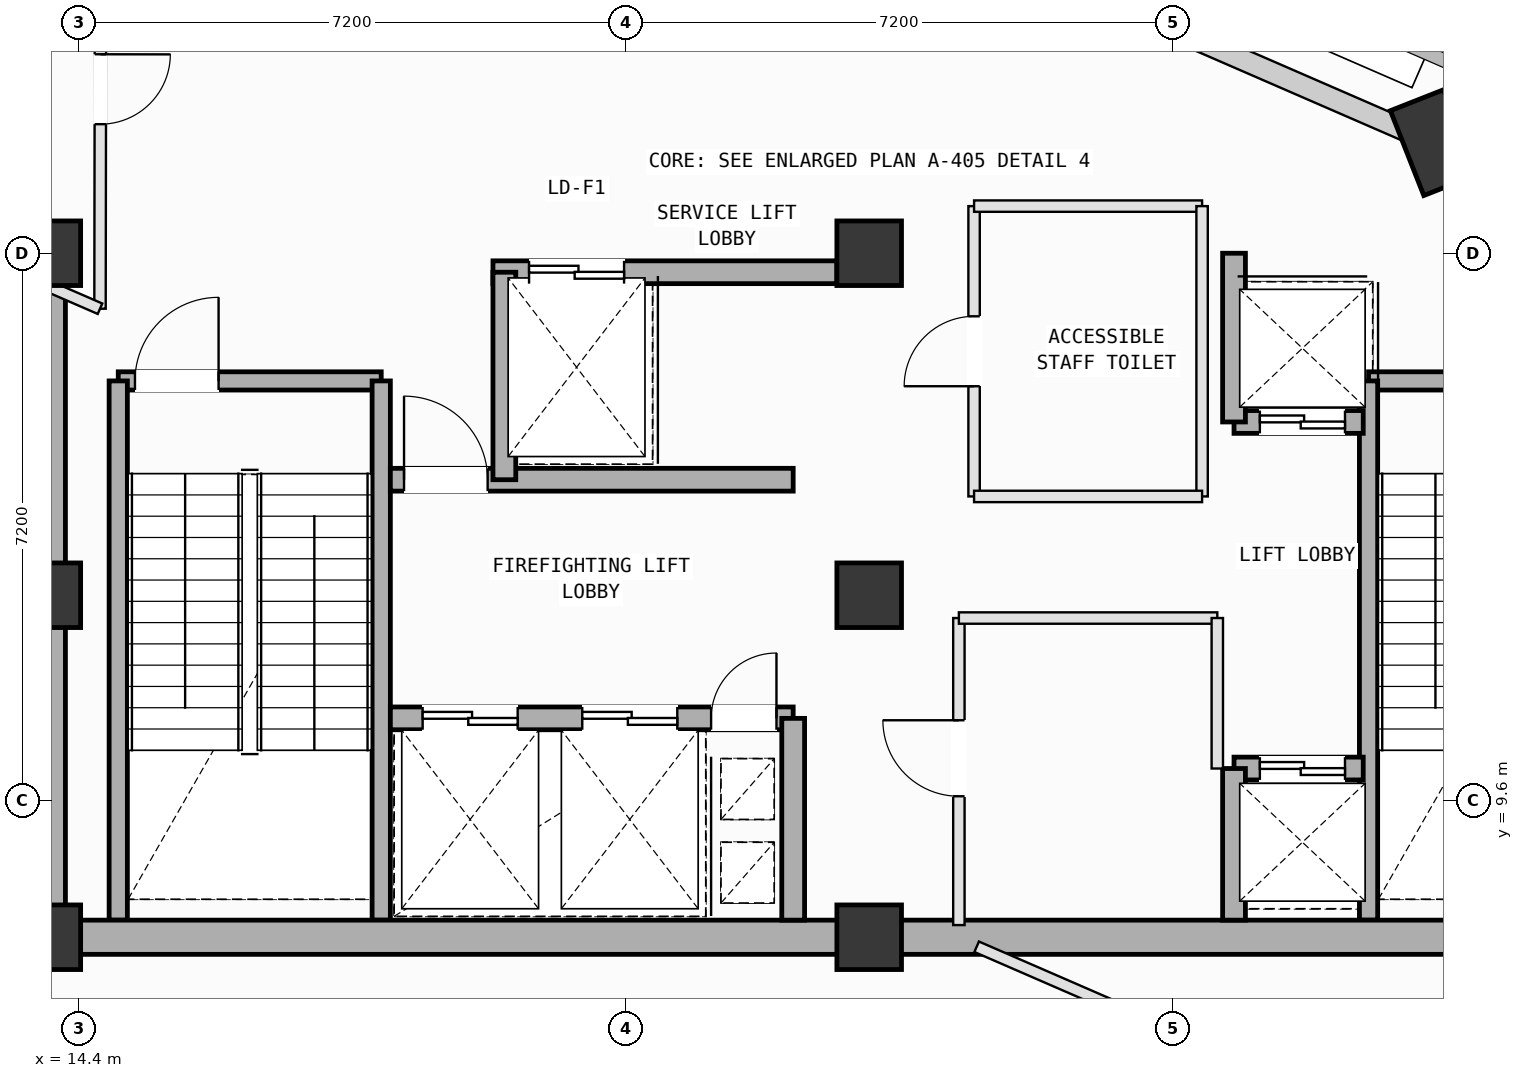
"""IFC4 building model, lengths in metres.
Left out: names, types, materials, properties, quantities, classifications, styles, units other than length and angle.
Written with IfcOpenShell. Run it as: python <this file> out.ifc"""

import sys

from ifc_helpers import new_model, si_unit, direction, frame, frame_2d, origin, origin_2d, place, context, subcontext, project, spatial, rectangle, extrude, element, fill, save


model = new_model("IFC4")
c1 = context("Model", 3, precision=1e-05, world=origin(), true_north=direction((0.0, 1.0)))
c2 = subcontext(c1, "Body", "Model", "MODEL_VIEW")
j1 = project(units=[si_unit("LENGTHUNIT", "METRE"), si_unit("PLANEANGLEUNIT", "RADIAN")], contexts=[c1])
p1 = place(None, origin())
s1 = spatial("IfcSite", under=j1, at=p1, CompositionType="ELEMENT")
p2 = place(p1, origin())
s2 = spatial("IfcBuilding", under=s1, at=p2, CompositionType="ELEMENT")
p3 = place(p2, frame((0.0, 0.0, 328.6)))
s3 = spatial("IfcBuildingStorey", under=s2, at=p3, CompositionType="ELEMENT", Elevation=328.6)
for number, where, z_axis, x_axis in (
    (1, (14.0, 7.8, 0.0), (0.0, 0.0, 1.0), (1.0, 0.0, 0.0)),
    (2, (14.0, 12.3, 0.0), (0.0, 0.0, 1.0), (1.0, 0.0, 0.0)),
    (3, (14.0, 16.8, 0.0), (0.0, 0.0, 1.0), (1.0, 0.0, 0.0)),
    (4, (24.8, 7.8, 0.0), (0.0, 0.0, 1.0), (1.0, 0.0, 0.0)),
    (5, (24.8, 12.3, 0.0), (0.0, 0.0, 1.0), (1.0, 0.0, 0.0)),
    (6, (24.8, 16.8, 0.0), (0.0, 0.0, 1.0), (1.0, 0.0, 0.0)),
):
    element("IfcColumn", number, at=place(p3, frame(where, z_axis=z_axis, x_axis=x_axis)), inside=s3, PredefinedType="COLUMN", context=c2, shape_type="SweptSolid", body=[
        extrude(rectangle(XDim=0.85, YDim=0.85, at=origin_2d()), origin(), (0.0, 0.0, 1.0), 4.8),
    ])
p4 = place(p3, frame((32.226, 18.255, 0.002), z_axis=(0.0, 0.0, 1.0), x_axis=(-0.366501226724, 0.930417567982, 0.0)))
e7 = element("IfcColumn", 7, at=p4, inside=s3, PredefinedType="COLUMN", context=c2, shape_type="SweptSolid", body=[
    extrude(rectangle(XDim=1.2, YDim=0.75, at=origin_2d()), origin(), (0.0, 0.0, 1.0), 4.796),
])
p5 = place(p3, frame((32.385, 18.619, 0.0), z_axis=(0.0, 0.0, 1.0), x_axis=(0.398753668733, 0.917058074318, 0.0)))
e8 = element("IfcWall", 8, at=p5, inside=s3, PredefinedType="SOLIDWALL", context=c2, shape_type="SweptSolid", body=[
    extrude(rectangle(XDim=6.155, YDim=0.28, at=frame_2d((3.078, 0.0))), origin(), (0.0, 0.0, 1.0), 4.065),
])
p6 = place(p5, frame((0.875, 0.0, 0.75)))
e9 = element("IfcOpeningElement", 9, at=p6, cuts=e8, PredefinedType="OPENING", context=c2, shape_type="SweptSolid", body=[
    extrude(rectangle(XDim=1.4, YDim=1.85, at=frame_2d((0.7, 0.925))), frame((0.0, 0.15, 0.0), z_axis=(0.0, -1.0, 0.0), x_axis=(1.0, 0.0, 0.0)), (0.0, 0.0, 1.0), 0.3),
])
p7 = place(p3, frame((25.484, 21.187, 0.0), z_axis=(0.0, 0.0, 1.0), x_axis=(0.917060568388, -0.398747932794, 0.0)))
e10 = element("IfcWall", 10, at=p7, inside=s3, PredefinedType="SOLIDWALL", context=c2, shape_type="SweptSolid", body=[
    extrude(rectangle(XDim=6.955, YDim=0.28, at=frame_2d((3.478, 0.0))), origin(), (0.0, 0.0, 1.0), 3.565),
])
p8 = place(p3, frame((14.92, 15.12, 0.0), z_axis=(0.0, 0.0, 1.0), x_axis=(1.0, 0.0, 0.0)))
e11 = element("IfcWall", 11, at=p8, inside=s3, PredefinedType="SOLIDWALL", context=c2, shape_type="SweptSolid", body=[
    extrude(rectangle(XDim=3.46, YDim=0.24, at=frame_2d((1.73, 0.0))), origin(), (0.0, 0.0, 1.0), 4.58),
])
p9 = place(p8, frame((0.22, 0.0, 0.0)))
e12 = element("IfcOpeningElement", 12, at=p9, cuts=e11, PredefinedType="OPENING", context=c2, shape_type="SweptSolid", body=[
    extrude(rectangle(XDim=1.1, YDim=2.15, at=frame_2d((0.55, 1.075))), frame((0.0, 0.13, 0.0), z_axis=(0.0, -1.0, 0.0), x_axis=(1.0, 0.0, 0.0)), (0.0, 0.0, 1.0), 0.26),
])
for number, where, z_axis, x_axis in (
    (13, (18.38, 15.12, 0.0), (0.0, 0.0, 1.0), (0.0, -1.0, 0.0)),
    (14, (14.92, 8.025, 0.0), (0.0, 0.0, 1.0), (0.0, 1.0, 0.0)),
):
    element("IfcWall", number, at=place(p3, frame(where, z_axis=z_axis, x_axis=x_axis)), inside=s3, PredefinedType="SOLIDWALL", context=c2, shape_type="SweptSolid", body=[
        extrude(rectangle(XDim=7.095, YDim=0.24, at=frame_2d((3.548, 0.0))), origin(), (0.0, 0.0, 1.0), 4.58),
    ])
p10 = place(p3, frame((31.37, 15.12, 0.0), z_axis=(0.0, 0.0, 1.0), x_axis=(1.0, 0.0, 0.0)))
e15 = element("IfcWall", 15, at=p10, inside=s3, PredefinedType="SOLIDWALL", context=c2, shape_type="SweptSolid", body=[
    extrude(rectangle(XDim=3.46, YDim=0.24, at=frame_2d((1.73, 0.0))), origin(), (0.0, 0.0, 1.0), 4.58),
])
p11 = place(p10, frame((2.14, 0.0, 0.0)))
e16 = element("IfcOpeningElement", 16, at=p11, cuts=e15, PredefinedType="OPENING", context=c2, shape_type="SweptSolid", body=[
    extrude(rectangle(XDim=1.1, YDim=2.15, at=frame_2d((0.55, 1.075))), frame((0.0, 0.13, 0.0), z_axis=(0.0, -1.0, 0.0), x_axis=(1.0, 0.0, 0.0)), (0.0, 0.0, 1.0), 0.26),
])
p12 = place(p3, frame((31.37, 8.025, 0.0), z_axis=(0.0, 0.0, 1.0), x_axis=(0.0, 1.0, 0.0)))
e17 = element("IfcWall", 17, at=p12, inside=s3, PredefinedType="SOLIDWALL", context=c2, shape_type="SweptSolid", body=[
    extrude(rectangle(XDim=7.095, YDim=0.24, at=frame_2d((3.548, 0.0))), origin(), (0.0, 0.0, 1.0), 4.58),
])
for number, where, z_axis, x_axis in (
    (18, (14.0, 7.8, 0.0), (0.0, 0.0, 1.0), (1.0, 0.0, 0.0)),
    (19, (24.8, 7.8, 0.0), (0.0, 0.0, 1.0), (1.0, 0.0, 0.0)),
):
    element("IfcWall", number, at=place(p3, frame(where, z_axis=z_axis, x_axis=x_axis)), inside=s3, PredefinedType="SHEAR", context=c2, shape_type="SweptSolid", body=[
        extrude(rectangle(XDim=10.8, YDim=0.45, at=frame_2d((5.4, 0.0))), origin(), (0.0, 0.0, 1.0), 4.58),
    ])
p13 = place(p3, frame((14.0, 16.8, 0.0), z_axis=(0.0, 0.0, 1.0), x_axis=(0.0, -1.0, 0.0)))
e20 = element("IfcWall", 20, at=p13, inside=s3, PredefinedType="SHEAR", context=c2, shape_type="SweptSolid", body=[
    extrude(rectangle(XDim=9.0, YDim=0.45, at=frame_2d((4.5, 0.0))), origin(), (0.0, 0.0, 1.0), 4.58),
])
p14 = place(p3, frame((19.85, 16.55, 0.0), z_axis=(0.0, 0.0, 1.0), x_axis=(1.0, 0.0, 0.0)))
e21 = element("IfcWall", 21, at=p14, inside=s3, PredefinedType="SOLIDWALL", context=c2, shape_type="SweptSolid", body=[
    extrude(rectangle(XDim=4.525, YDim=0.3, at=frame_2d((2.262, 0.0))), origin(), (0.0, 0.0, 1.0), 4.58),
])
p15 = place(p14, frame((0.475, 0.0, 0.0)))
e22 = element("IfcOpeningElement", 22, at=p15, cuts=e21, PredefinedType="OPENING", context=c2, shape_type="SweptSolid", body=[
    extrude(rectangle(XDim=1.25, YDim=2.18, at=frame_2d((0.625, 1.09))), frame((0.0, 0.16, 0.0), z_axis=(0.0, -1.0, 0.0), x_axis=(1.0, 0.0, 0.0)), (0.0, 0.0, 1.0), 0.32),
])
p16 = place(p3, frame((18.5, 10.68, 0.0), z_axis=(0.0, 0.0, 1.0), x_axis=(1.0, 0.0, 0.0)))
e23 = element("IfcWall", 23, at=p16, inside=s3, PredefinedType="SOLIDWALL", context=c2, shape_type="SweptSolid", body=[
    extrude(rectangle(XDim=5.3, YDim=0.3, at=frame_2d((2.65, 0.0))), origin(), (0.0, 0.0, 1.0), 4.58),
])
p17 = place(p16, frame((4.22, 0.0, 0.0)))
e24 = element("IfcOpeningElement", 24, at=p17, cuts=e23, PredefinedType="OPENING", context=c2, shape_type="SweptSolid", body=[
    extrude(rectangle(XDim=0.86, YDim=2.06, at=frame_2d((0.43, 1.03))), frame((0.0, 0.16, 0.0), z_axis=(0.0, -1.0, 0.0), x_axis=(1.0, 0.0, 0.0)), (0.0, 0.0, 1.0), 0.32),
])
p18 = place(p16, frame((0.425, 0.0, 0.0)))
e25 = element("IfcOpeningElement", 25, at=p18, cuts=e23, PredefinedType="OPENING", context=c2, shape_type="SweptSolid", body=[
    extrude(rectangle(XDim=1.25, YDim=2.18, at=frame_2d((0.625, 1.09))), frame((0.0, 0.16, 0.0), z_axis=(0.0, -1.0, 0.0), x_axis=(1.0, 0.0, 0.0)), (0.0, 0.0, 1.0), 0.32),
])
p19 = place(p16, frame((2.525, 0.0, 0.0)))
e26 = element("IfcOpeningElement", 26, at=p19, cuts=e23, PredefinedType="OPENING", context=c2, shape_type="SweptSolid", body=[
    extrude(rectangle(XDim=1.25, YDim=2.18, at=frame_2d((0.625, 1.09))), frame((0.0, 0.16, 0.0), z_axis=(0.0, -1.0, 0.0), x_axis=(1.0, 0.0, 0.0)), (0.0, 0.0, 1.0), 0.32),
])
p20 = place(p3, frame((18.5, 13.82, 0.0), z_axis=(0.0, 0.0, 1.0), x_axis=(1.0, 0.0, 0.0)))
e27 = element("IfcWall", 27, at=p20, inside=s3, PredefinedType="SOLIDWALL", context=c2, shape_type="SweptSolid", body=[
    extrude(rectangle(XDim=5.3, YDim=0.3, at=frame_2d((2.65, 0.0))), origin(), (0.0, 0.0, 1.0), 4.58),
])
p21 = place(p20, frame((0.18, 0.0, 0.0)))
e28 = element("IfcOpeningElement", 28, at=p21, cuts=e27, PredefinedType="OPENING", context=c2, shape_type="SweptSolid", body=[
    extrude(rectangle(XDim=1.1, YDim=2.15, at=frame_2d((0.55, 1.075))), frame((0.0, 0.16, 0.0), z_axis=(0.0, -1.0, 0.0), x_axis=(1.0, 0.0, 0.0)), (0.0, 0.0, 1.0), 0.32),
])
p22 = place(p3, frame((23.8, 8.025, 0.0), z_axis=(0.0, 0.0, 1.0), x_axis=(0.0, 1.0, 0.0)))
e29 = element("IfcWall", 29, at=p22, inside=s3, PredefinedType="SOLIDWALL", context=c2, shape_type="SweptSolid", body=[
    extrude(rectangle(XDim=2.655, YDim=0.3, at=frame_2d((1.328, 0.0))), origin(), (0.0, 0.0, 1.0), 4.58),
])
p23 = place(p3, frame((20.0, 13.82, 0.0), z_axis=(0.0, 0.0, 1.0), x_axis=(0.0, 1.0, 0.0)))
e30 = element("IfcWall", 30, at=p23, inside=s3, PredefinedType="SOLIDWALL", context=c2, shape_type="SweptSolid", body=[
    extrude(rectangle(XDim=2.73, YDim=0.3, at=frame_2d((1.365, 0.0))), origin(), (0.0, 0.0, 1.0), 4.58),
])
p24 = place(p3, frame((29.6, 10.02, 0.0), z_axis=(0.0, 0.0, 1.0), x_axis=(1.0, 0.0, 0.0)))
e31 = element("IfcWall", 31, at=p24, inside=s3, PredefinedType="SOLIDWALL", context=c2, shape_type="SweptSolid", body=[
    extrude(rectangle(XDim=1.7, YDim=0.3, at=frame_2d((0.85, 0.0))), origin(), (0.0, 0.0, 1.0), 4.58),
])
p25 = place(p24, frame((0.34, 0.0, 0.0)))
e32 = element("IfcOpeningElement", 32, at=p25, cuts=e31, PredefinedType="OPENING", context=c2, shape_type="SweptSolid", body=[
    extrude(rectangle(XDim=1.12, YDim=2.15, at=frame_2d((0.56, 1.075))), frame((0.0, 0.16, 0.0), z_axis=(0.0, -1.0, 0.0), x_axis=(1.0, 0.0, 0.0)), (0.0, 0.0, 1.0), 0.32),
])
p26 = place(p3, frame((29.6, 8.025, 0.0), z_axis=(0.0, 0.0, 1.0), x_axis=(0.0, 1.0, 0.0)))
e33 = element("IfcWall", 33, at=p26, inside=s3, PredefinedType="SOLIDWALL", context=c2, shape_type="SweptSolid", body=[
    extrude(rectangle(XDim=1.995, YDim=0.3, at=frame_2d((0.998, 0.0))), origin(), (0.0, 0.0, 1.0), 4.58),
])
p27 = place(p3, frame((29.6, 14.58, 0.0), z_axis=(0.0, 0.0, 1.0), x_axis=(1.0, 0.0, 0.0)))
e34 = element("IfcWall", 34, at=p27, inside=s3, PredefinedType="SOLIDWALL", context=c2, shape_type="SweptSolid", body=[
    extrude(rectangle(XDim=1.7, YDim=0.3, at=frame_2d((0.85, 0.0))), origin(), (0.0, 0.0, 1.0), 4.58),
])
p28 = place(p27, frame((0.34, 0.0, 0.0)))
e35 = element("IfcOpeningElement", 35, at=p28, cuts=e34, PredefinedType="OPENING", context=c2, shape_type="SweptSolid", body=[
    extrude(rectangle(XDim=1.12, YDim=2.15, at=frame_2d((0.56, 1.075))), frame((0.0, 0.16, 0.0), z_axis=(0.0, -1.0, 0.0), x_axis=(1.0, 0.0, 0.0)), (0.0, 0.0, 1.0), 0.32),
])
p29 = place(p3, frame((29.6, 14.58, 0.0), z_axis=(0.0, 0.0, 1.0), x_axis=(0.0, 1.0, 0.0)))
e36 = element("IfcWall", 36, at=p29, inside=s3, PredefinedType="SOLIDWALL", context=c2, shape_type="SweptSolid", body=[
    extrude(rectangle(XDim=2.22, YDim=0.3, at=frame_2d((1.11, 0.0))), origin(), (0.0, 0.0, 1.0), 4.58),
])
p30 = place(p3, frame((25.98, 7.96, 0.0), z_axis=(0.0, 0.0, 1.0), x_axis=(0.0, 1.0, 0.0)))
e37 = element("IfcWall", 37, at=p30, inside=s3, PredefinedType="PARTITIONING", context=c2, shape_type="SweptSolid", body=[
    extrude(rectangle(XDim=4.04, YDim=0.15, at=frame_2d((2.02, 0.0))), origin(), (0.0, 0.0, 1.0), 4.58),
])
p31 = place(p30, frame((1.695, 0.0, 0.0)))
e38 = element("IfcOpeningElement", 38, at=p31, cuts=e37, PredefinedType="OPENING", context=c2, shape_type="SweptSolid", body=[
    extrude(rectangle(XDim=1.0, YDim=2.12, at=frame_2d((0.5, 1.06))), frame((0.0, 0.085, 0.0), z_axis=(0.0, -1.0, 0.0), x_axis=(1.0, 0.0, 0.0)), (0.0, 0.0, 1.0), 0.17),
])
p32 = place(p3, frame((25.98, 12.0, 0.0), z_axis=(0.0, 0.0, 1.0), x_axis=(1.0, 0.0, 0.0)))
e39 = element("IfcWall", 39, at=p32, inside=s3, PredefinedType="PARTITIONING", context=c2, shape_type="SweptSolid", body=[
    extrude(rectangle(XDim=3.4, YDim=0.15, at=frame_2d((1.7, 0.0))), origin(), (0.0, 0.0, 1.0), 4.58),
])
p33 = place(p3, frame((29.38, 12.0, 0.0), z_axis=(0.0, 0.0, 1.0), x_axis=(0.0, -1.0, 0.0)))
e40 = element("IfcWall", 40, at=p33, inside=s3, PredefinedType="PARTITIONING", context=c2, shape_type="SweptSolid", body=[
    extrude(rectangle(XDim=1.98, YDim=0.15, at=frame_2d((0.99, 0.0))), origin(), (0.0, 0.0, 1.0), 4.58),
])
p34 = place(p3, frame((26.18, 13.6, 0.0), z_axis=(0.0, 0.0, 1.0), x_axis=(0.0, 1.0, 0.0)))
e41 = element("IfcWall", 41, at=p34, inside=s3, PredefinedType="PARTITIONING", context=c2, shape_type="SweptSolid", body=[
    extrude(rectangle(XDim=3.82, YDim=0.15, at=frame_2d((1.91, 0.0))), origin(), (0.0, 0.0, 1.0), 4.58),
])
p35 = place(p34, frame((1.45, 0.0, 0.0)))
e42 = element("IfcOpeningElement", 42, at=p35, cuts=e41, PredefinedType="OPENING", context=c2, shape_type="SweptSolid", body=[
    extrude(rectangle(XDim=0.92, YDim=2.1, at=frame_2d((0.46, 1.05))), frame((0.0, 0.085, 0.0), z_axis=(0.0, -1.0, 0.0), x_axis=(1.0, 0.0, 0.0)), (0.0, 0.0, 1.0), 0.17),
])
p36 = place(p3, frame((26.18, 17.42, 0.0), z_axis=(0.0, 0.0, 1.0), x_axis=(1.0, 0.0, 0.0)))
e43 = element("IfcWall", 43, at=p36, inside=s3, PredefinedType="PARTITIONING", context=c2, shape_type="SweptSolid", body=[
    extrude(rectangle(XDim=3.0, YDim=0.15, at=frame_2d((1.5, 0.0))), origin(), (0.0, 0.0, 1.0), 4.58),
])
p37 = place(p3, frame((29.18, 17.42, 0.0), z_axis=(0.0, 0.0, 1.0), x_axis=(0.0, -1.0, 0.0)))
e44 = element("IfcWall", 44, at=p37, inside=s3, PredefinedType="PARTITIONING", context=c2, shape_type="SweptSolid", body=[
    extrude(rectangle(XDim=3.82, YDim=0.15, at=frame_2d((1.91, 0.0))), origin(), (0.0, 0.0, 1.0), 4.58),
])
p38 = place(p3, frame((29.18, 13.6, 0.0), z_axis=(0.0, 0.0, 1.0), x_axis=(-1.0, 0.0, 0.0)))
e45 = element("IfcWall", 45, at=p38, inside=s3, PredefinedType="PARTITIONING", context=c2, shape_type="SweptSolid", body=[
    extrude(rectangle(XDim=3.0, YDim=0.15, at=frame_2d((1.5, 0.0))), origin(), (0.0, 0.0, 1.0), 4.58),
])
p39 = place(p3, frame((26.214, 7.675, 0.0), z_axis=(0.0, 0.0, 1.0), x_axis=(0.91704872202, -0.398775176561, 0.0)))
e46 = element("IfcWall", 46, at=p39, inside=s3, PredefinedType="PARTITIONING", context=c2, shape_type="SweptSolid", body=[
    extrude(rectangle(XDim=9.825, YDim=0.15, at=frame_2d((4.913, 0.0))), origin(), (0.0, 0.0, 1.0), 4.58),
])
p40 = place(p39, frame((7.74, 0.0, 0.0)))
e47 = element("IfcOpeningElement", 47, at=p40, cuts=e46, PredefinedType="OPENING", context=c2, shape_type="SweptSolid", body=[
    extrude(rectangle(XDim=1.2, YDim=2.15, at=frame_2d((0.6, 1.075))), frame((0.0, 0.085, 0.0), z_axis=(0.0, -1.0, 0.0), x_axis=(1.0, 0.0, 0.0)), (0.0, 0.0, 1.0), 0.17),
])
p41 = place(p3, frame((32.323, -3.214, 0.0), z_axis=(0.0, 0.0, 1.0), x_axis=(-0.917060632086, 0.398747786298, 0.0)))
e48 = element("IfcWall", 48, at=p41, inside=s3, PredefinedType="PARTITIONING", context=c2, shape_type="SweptSolid", body=[
    extrude(rectangle(XDim=26.771, YDim=0.15, at=frame_2d((13.386, 0.0))), origin(), (0.0, 0.0, 1.0), 4.58),
])
p42 = place(p3, frame((14.689, 21.846, 0.0), z_axis=(0.0, 0.0, 1.0), x_axis=(-0.001563951084, -0.999998777028, 0.0)))
e49 = element("IfcWall", 49, at=p42, inside=s3, PredefinedType="PARTITIONING", context=c2, shape_type="SweptSolid", body=[
    extrude(rectangle(XDim=5.776, YDim=0.15, at=frame_2d((2.888, 0.0))), origin(), (0.0, 0.0, 1.0), 4.58),
])
p43 = place(p42, frame((2.428, 0.0, 0.0)))
e50 = element("IfcOpeningElement", 50, at=p43, cuts=e49, PredefinedType="OPENING", context=c2, shape_type="SweptSolid", body=[
    extrude(rectangle(XDim=0.92, YDim=2.1, at=frame_2d((0.46, 1.05))), frame((0.0, 0.085, 0.0), z_axis=(0.0, -1.0, 0.0), x_axis=(1.0, 0.0, 0.0)), (0.0, 0.0, 1.0), 0.17),
])
p44 = place(p3, frame((14.68, 16.07, 0.0), z_axis=(0.0, 0.0, 1.0), x_axis=(-0.917080709133, 0.398701608895, 0.0)))
e51 = element("IfcWall", 51, at=p44, inside=s3, PredefinedType="PARTITIONING", context=c2, shape_type="SweptSolid", body=[
    extrude(rectangle(XDim=5.465, YDim=0.15, at=frame_2d((2.732, 0.0))), origin(), (0.0, 0.0, 1.0), 3.565),
])
p45 = place(p9, origin())
e52 = element("IfcDoor", 52, at=p45, inside=s3, OperationType="SINGLE_SWING_RIGHT", PredefinedType="DOOR", context=c2, shape_type="SweptSolid", body=[
    extrude(rectangle(XDim=1.1, YDim=2.15, at=frame_2d((0.55, 1.075))), frame((0.0, 0.025, 0.0), z_axis=(0.0, -1.0, 0.0), x_axis=(1.0, 0.0, 0.0)), (0.0, 0.0, 1.0), 0.05),
])
fill(e12, e52)
p46 = place(p17, origin())
e53 = element("IfcDoor", 53, at=p46, inside=s3, OperationType="SINGLE_SWING_RIGHT", PredefinedType="DOOR", context=c2, shape_type="SweptSolid", body=[
    extrude(rectangle(XDim=0.86, YDim=2.06, at=frame_2d((0.43, 1.03))), frame((0.0, 0.025, 0.0), z_axis=(0.0, -1.0, 0.0), x_axis=(1.0, 0.0, 0.0)), (0.0, 0.0, 1.0), 0.05),
])
fill(e24, e53)
p47 = place(p21, origin())
e54 = element("IfcDoor", 54, at=p47, inside=s3, OperationType="SINGLE_SWING_LEFT", PredefinedType="DOOR", context=c2, shape_type="SweptSolid", body=[
    extrude(rectangle(XDim=1.1, YDim=2.15, at=frame_2d((0.55, 1.075))), frame((0.0, 0.025, 0.0), z_axis=(0.0, -1.0, 0.0), x_axis=(1.0, 0.0, 0.0)), (0.0, 0.0, 1.0), 0.05),
])
fill(e28, e54)
p48 = place(p18, origin())
e55 = element("IfcDoor", 55, at=p48, inside=s3, OperationType="DOUBLE_DOOR_SLIDING", PredefinedType="DOOR", context=c2, shape_type="SweptSolid", body=[
    extrude(rectangle(XDim=1.25, YDim=2.18, at=frame_2d((0.625, 1.09))), frame((0.0, 0.025, 0.0), z_axis=(0.0, -1.0, 0.0), x_axis=(1.0, 0.0, 0.0)), (0.0, 0.0, 1.0), 0.05),
])
fill(e25, e55)
p49 = place(p19, origin())
e56 = element("IfcDoor", 56, at=p49, inside=s3, OperationType="DOUBLE_DOOR_SLIDING", PredefinedType="DOOR", context=c2, shape_type="SweptSolid", body=[
    extrude(rectangle(XDim=1.25, YDim=2.18, at=frame_2d((0.625, 1.09))), frame((0.0, 0.025, 0.0), z_axis=(0.0, -1.0, 0.0), x_axis=(1.0, 0.0, 0.0)), (0.0, 0.0, 1.0), 0.05),
])
fill(e26, e56)
p50 = place(p25, origin())
e57 = element("IfcDoor", 57, at=p50, inside=s3, OperationType="DOUBLE_DOOR_SLIDING", PredefinedType="DOOR", context=c2, shape_type="SweptSolid", body=[
    extrude(rectangle(XDim=1.12, YDim=2.15, at=frame_2d((0.56, 1.075))), frame((0.0, 0.025, 0.0), z_axis=(0.0, -1.0, 0.0), x_axis=(1.0, 0.0, 0.0)), (0.0, 0.0, 1.0), 0.05),
])
fill(e32, e57)
p51 = place(p28, origin())
e58 = element("IfcDoor", 58, at=p51, inside=s3, OperationType="DOUBLE_DOOR_SLIDING", PredefinedType="DOOR", context=c2, shape_type="SweptSolid", body=[
    extrude(rectangle(XDim=1.12, YDim=2.15, at=frame_2d((0.56, 1.075))), frame((0.0, 0.025, 0.0), z_axis=(0.0, -1.0, 0.0), x_axis=(1.0, 0.0, 0.0)), (0.0, 0.0, 1.0), 0.05),
])
fill(e35, e58)
p52 = place(p15, origin())
e59 = element("IfcDoor", 59, at=p52, inside=s3, OperationType="DOUBLE_DOOR_SLIDING", PredefinedType="DOOR", context=c2, shape_type="SweptSolid", body=[
    extrude(rectangle(XDim=1.25, YDim=2.18, at=frame_2d((0.625, 1.09))), frame((0.0, 0.025, 0.0), z_axis=(0.0, -1.0, 0.0), x_axis=(1.0, 0.0, 0.0)), (0.0, 0.0, 1.0), 0.05),
])
fill(e22, e59)
p53 = place(p31, origin())
e60 = element("IfcDoor", 60, at=p53, inside=s3, OperationType="SINGLE_SWING_RIGHT", PredefinedType="DOOR", context=c2, shape_type="SweptSolid", body=[
    extrude(rectangle(XDim=1.0, YDim=2.12, at=frame_2d((0.5, 1.06))), frame((0.0, 0.025, 0.0), z_axis=(0.0, -1.0, 0.0), x_axis=(1.0, 0.0, 0.0)), (0.0, 0.0, 1.0), 0.05),
])
fill(e38, e60)
p54 = place(p35, origin())
e61 = element("IfcDoor", 61, at=p54, inside=s3, OperationType="SINGLE_SWING_LEFT", PredefinedType="DOOR", context=c2, shape_type="SweptSolid", body=[
    extrude(rectangle(XDim=0.92, YDim=2.1, at=frame_2d((0.46, 1.05))), frame((0.0, 0.025, 0.0), z_axis=(0.0, -1.0, 0.0), x_axis=(1.0, 0.0, 0.0)), (0.0, 0.0, 1.0), 0.05),
])
fill(e42, e61)
p55 = place(p43, origin())
e62 = element("IfcDoor", 62, at=p55, inside=s3, OperationType="SINGLE_SWING_LEFT", PredefinedType="DOOR", context=c2, shape_type="SweptSolid", body=[
    extrude(rectangle(XDim=0.92, YDim=2.1, at=frame_2d((0.46, 1.05))), frame((0.0, 0.025, 0.0), z_axis=(0.0, -1.0, 0.0), x_axis=(1.0, 0.0, 0.0)), (0.0, 0.0, 1.0), 0.05),
])
fill(e50, e62)
save(model, sys.argv[1])
